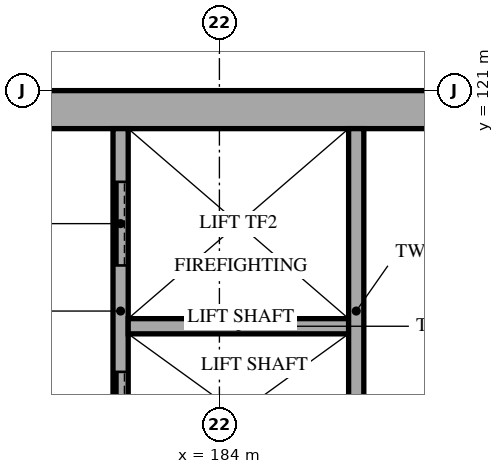
"""IFC4 building model, lengths in metres.
Left out: names, types, materials, properties, quantities, classifications, styles, units other than length and angle.
Written with IfcOpenShell. Run it as: python <this file> out.ifc"""

import sys

from ifc_helpers import new_model, si_unit, direction, frame, frame_2d, origin, place, context, subcontext, project, spatial, rectangle, extrude, element, fill, save


model = new_model("IFC4")
c1 = context("Model", 3, precision=1e-05, world=origin(), true_north=direction((0.0, 1.0)))
c2 = subcontext(c1, "Body", "Model", "MODEL_VIEW")
j1 = project(units=[si_unit("LENGTHUNIT", "METRE"), si_unit("PLANEANGLEUNIT", "RADIAN")], contexts=[c1])
p1 = place(None, origin())
s1 = spatial("IfcSite", under=j1, at=p1, CompositionType="ELEMENT")
p2 = place(p1, origin())
s2 = spatial("IfcBuilding", under=s1, at=p2, CompositionType="ELEMENT")
p3 = place(p2, frame((0.0, 0.0, 19.2)))
s3 = spatial("IfcBuildingStorey", under=s2, at=p3, CompositionType="ELEMENT", Elevation=19.2)
p4 = place(p3, frame((172.0, 120.75, 0.0), z_axis=(0.0, 0.0, 1.0), x_axis=(1.0, 0.0, 0.0)))
e1 = element("IfcWall", 1, at=p4, inside=s3, PredefinedType="SHEAR", context=c2, shape_type="SweptSolid", body=[
    extrude(rectangle(XDim=18.0, YDim=0.5, at=frame_2d((9.0, 0.0))), origin(), (0.0, 0.0, 1.0), 4.2),
])
p5 = place(p4, frame((8.3, 0.0, 0.0)))
e2 = element("IfcOpeningElement", 2, at=p5, cuts=e1, PredefinedType="OPENING", context=c2, shape_type="SweptSolid", body=[
    extrude(rectangle(XDim=1.2, YDim=2.1, at=frame_2d((0.6, 1.05))), frame((0.0, 0.26, 0.0), z_axis=(0.0, -1.0, 0.0), x_axis=(1.0, 0.0, 0.0)), (0.0, 0.0, 1.0), 0.52),
])
p6 = place(p4, frame((15.2, 0.0, 0.0)))
e3 = element("IfcOpeningElement", 3, at=p6, cuts=e1, PredefinedType="OPENING", context=c2, shape_type="SweptSolid", body=[
    extrude(rectangle(XDim=1.0, YDim=2.1, at=frame_2d((0.5, 1.05))), frame((0.0, 0.26, 0.0), z_axis=(0.0, -1.0, 0.0), x_axis=(1.0, 0.0, 0.0)), (0.0, 0.0, 1.0), 0.52),
])
p7 = place(p3, frame((182.7, 115.7, 0.0), z_axis=(0.0, 0.0, 1.0), x_axis=(0.0, 1.0, 0.0)))
e4 = element("IfcWall", 4, at=p7, inside=s3, PredefinedType="SOLIDWALL", context=c2, shape_type="SweptSolid", body=[
    extrude(rectangle(XDim=4.8, YDim=0.2, at=frame_2d((2.4, 0.0))), origin(), (0.0, 0.0, 1.0), 4.0),
])
p8 = place(p7, frame((0.5, 0.0, 0.0)))
e5 = element("IfcOpeningElement", 5, at=p8, cuts=e4, PredefinedType="OPENING", context=c2, shape_type="SweptSolid", body=[
    extrude(rectangle(XDim=1.1, YDim=2.1, at=frame_2d((0.55, 1.05))), frame((0.0, 0.11, 0.0), z_axis=(0.0, -1.0, 0.0), x_axis=(1.0, 0.0, 0.0)), (0.0, 0.0, 1.0), 0.22),
])
p9 = place(p7, frame((3.0, 0.0, 0.0)))
e6 = element("IfcOpeningElement", 6, at=p9, cuts=e4, PredefinedType="OPENING", context=c2, shape_type="SweptSolid", body=[
    extrude(rectangle(XDim=1.1, YDim=2.1, at=frame_2d((0.55, 1.05))), frame((0.0, 0.11, 0.0), z_axis=(0.0, -1.0, 0.0), x_axis=(1.0, 0.0, 0.0)), (0.0, 0.0, 1.0), 0.22),
])
p10 = place(p3, frame((182.8, 117.9, 0.0), z_axis=(0.0, 0.0, 1.0), x_axis=(1.0, 0.0, 0.0)))
e7 = element("IfcWall", 7, at=p10, inside=s3, PredefinedType="SOLIDWALL", context=c2, shape_type="SweptSolid", body=[
    extrude(rectangle(XDim=2.9, YDim=0.2, at=frame_2d((1.45, 0.0))), origin(), (0.0, 0.0, 1.0), 4.0),
])
p11 = place(p3, frame((185.8, 115.7, 0.0), z_axis=(0.0, 0.0, 1.0), x_axis=(0.0, 1.0, 0.0)))
e8 = element("IfcWall", 8, at=p11, inside=s3, PredefinedType="SOLIDWALL", context=c2, shape_type="SweptSolid", body=[
    extrude(rectangle(XDim=4.8, YDim=0.2, at=frame_2d((2.4, 0.0))), origin(), (0.0, 0.0, 1.0), 4.0),
])
p12 = place(p8, origin())
e9 = element("IfcDoor", 9, at=p12, inside=s3, OperationType="SLIDING_TO_LEFT", PredefinedType="DOOR", context=c2, shape_type="SweptSolid", body=[
    extrude(rectangle(XDim=1.1, YDim=2.1, at=frame_2d((0.55, 1.05))), frame((0.0, 0.025, 0.0), z_axis=(0.0, -1.0, 0.0), x_axis=(1.0, 0.0, 0.0)), (0.0, 0.0, 1.0), 0.05),
])
fill(e5, e9)
p13 = place(p9, origin())
e10 = element("IfcDoor", 10, at=p13, inside=s3, OperationType="SLIDING_TO_LEFT", PredefinedType="DOOR", context=c2, shape_type="SweptSolid", body=[
    extrude(rectangle(XDim=1.1, YDim=2.1, at=frame_2d((0.55, 1.05))), frame((0.0, 0.025, 0.0), z_axis=(0.0, -1.0, 0.0), x_axis=(1.0, 0.0, 0.0)), (0.0, 0.0, 1.0), 0.05),
])
fill(e6, e10)
save(model, sys.argv[1])
